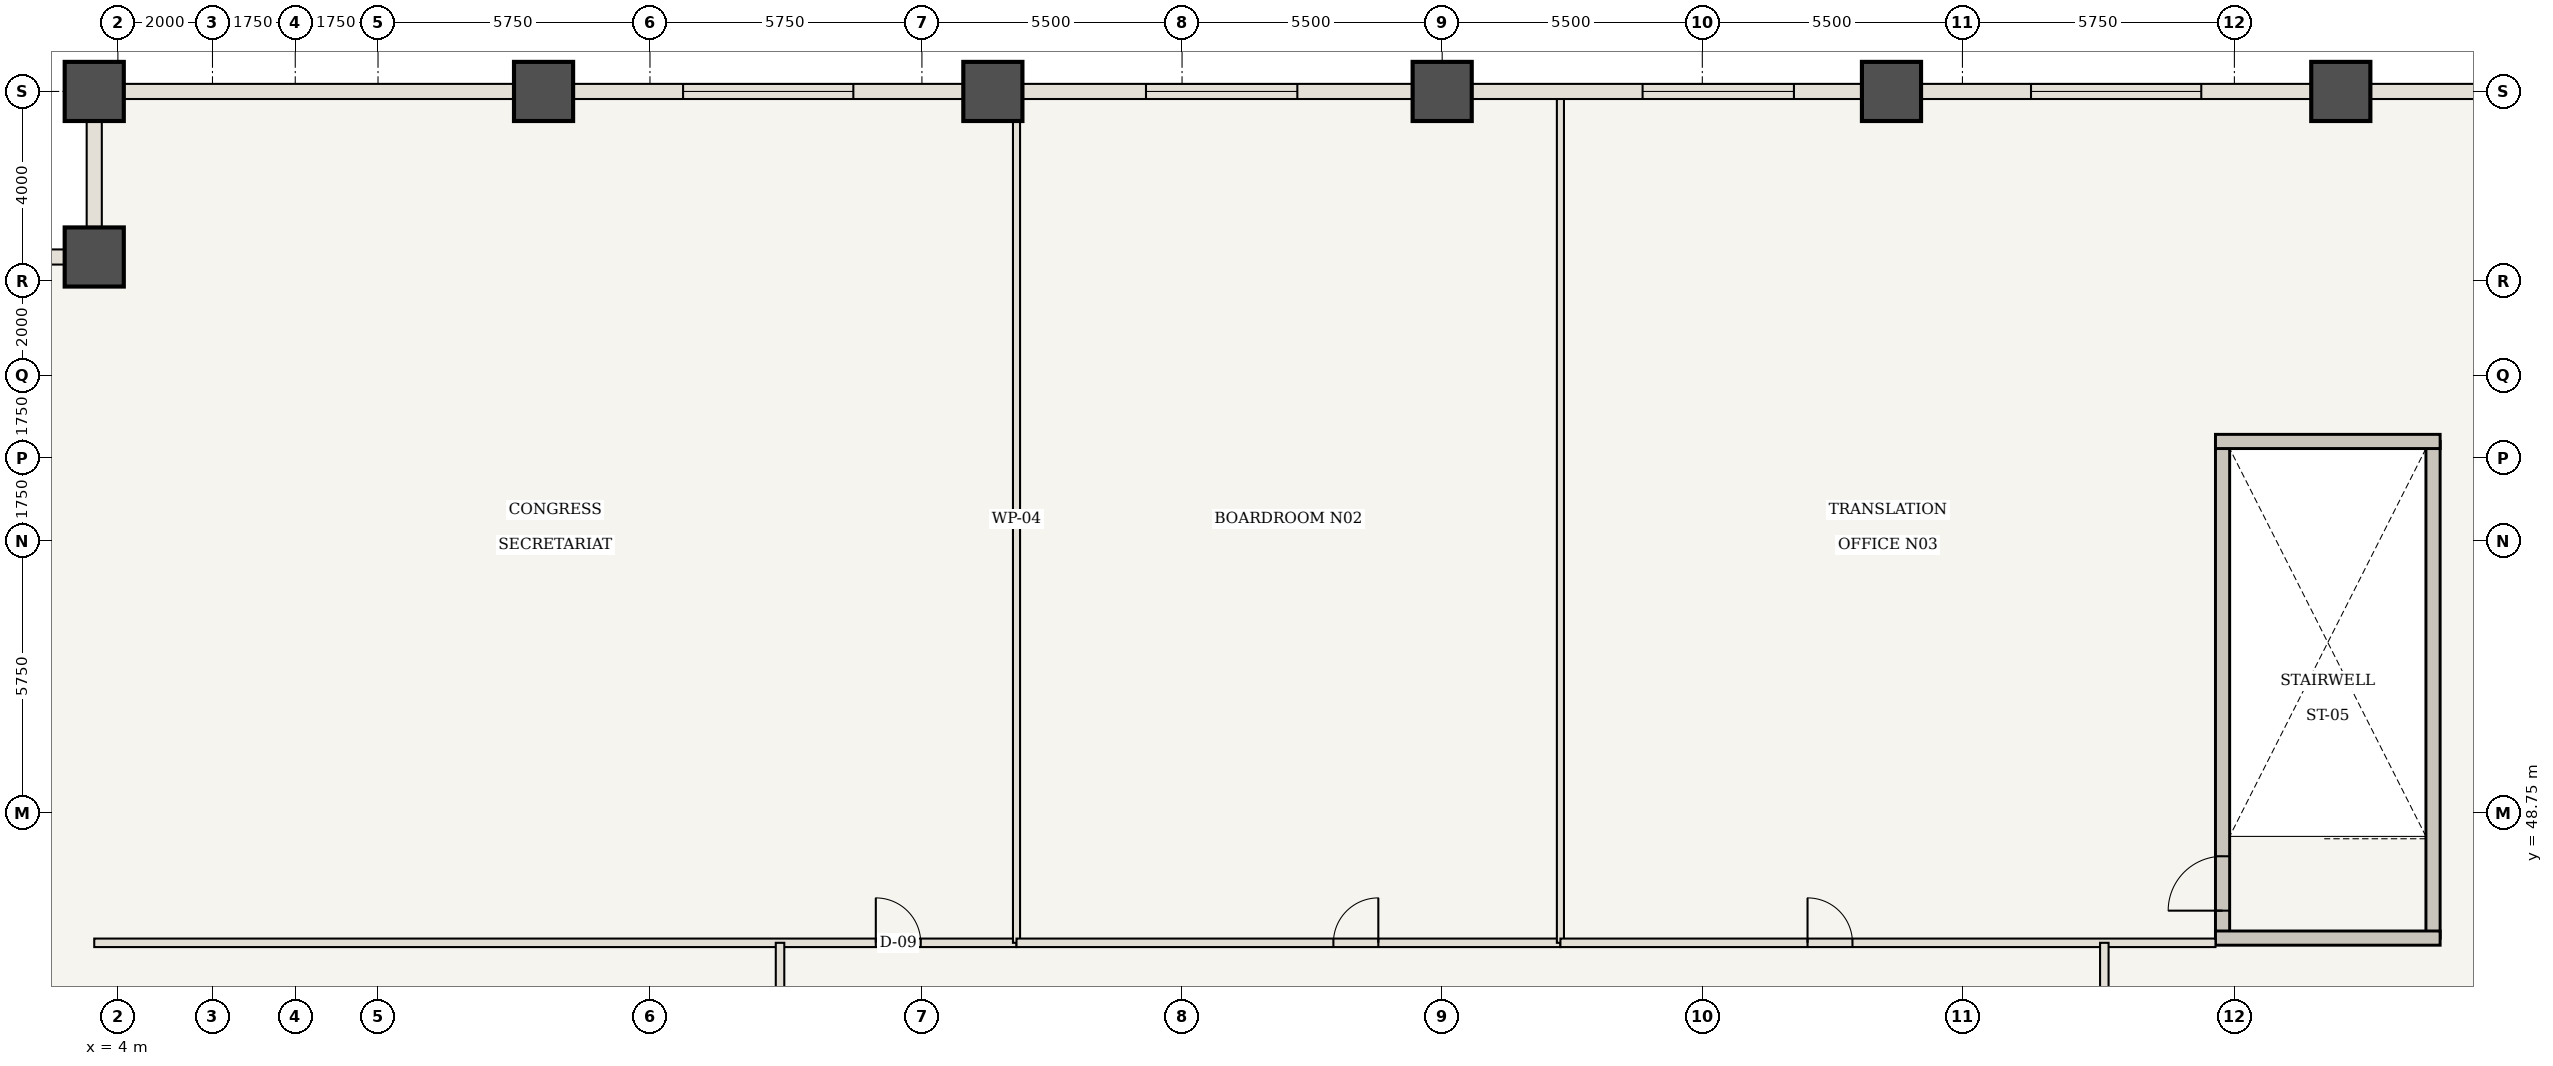
"""IFC4 building model, lengths in metres.
Left out: names, types, materials, properties, quantities, classifications, styles, units other than length and angle.
Written with IfcOpenShell. Run it as: python <this file> out.ifc"""

import sys

from ifc_helpers import new_model, si_unit, direction, frame, frame_2d, origin, origin_2d, place, context, subcontext, project, spatial, rectangle, extrude, element, fill, save


model = new_model("IFC4")
c1 = context("Model", 3, precision=1e-05, world=origin(), true_north=direction((0.0, 1.0)))
c2 = subcontext(c1, "Body", "Model", "MODEL_VIEW")
j1 = project(units=[si_unit("LENGTHUNIT", "METRE"), si_unit("PLANEANGLEUNIT", "RADIAN")], contexts=[c1])
p1 = place(None, origin())
s1 = spatial("IfcSite", under=j1, at=p1, CompositionType="ELEMENT")
p2 = place(p1, origin())
s2 = spatial("IfcBuilding", under=s1, at=p2, CompositionType="ELEMENT")
p3 = place(p2, frame((0.0, 0.0, 29.4)))
s3 = spatial("IfcBuildingStorey", under=s2, at=p3, CompositionType="ELEMENT", Elevation=29.4)
for number, where, z_axis, x_axis in (
    (1, (3.5, 64.0, 0.0), (0.0, 0.0, 1.0), (1.0, 0.0, 0.0)),
    (2, (3.5, 60.5, 0.0), (0.0, 0.0, 1.0), (1.0, 0.0, 0.0)),
    (3, (13.0, 64.0, 0.0), (0.0, 0.0, 1.0), (1.0, 0.0, 0.0)),
    (4, (22.5, 64.0, 0.0), (0.0, 0.0, 1.0), (1.0, 0.0, 0.0)),
    (5, (32.0, 64.0, 0.0), (0.0, 0.0, 1.0), (1.0, 0.0, 0.0)),
    (6, (41.5, 64.0, 0.0), (0.0, 0.0, 1.0), (1.0, 0.0, 0.0)),
    (7, (51.0, 64.0, 0.0), (0.0, 0.0, 1.0), (1.0, 0.0, 0.0)),
):
    element("IfcColumn", number, at=place(p3, frame(where, z_axis=z_axis, x_axis=x_axis)), inside=s3, PredefinedType="COLUMN", context=c2, shape_type="SweptSolid", body=[
        extrude(rectangle(XDim=1.25, YDim=1.25, at=origin_2d()), origin(), (0.0, 0.0, 1.0), 4.48),
    ])
p4 = place(p3, frame((48.5, 46.1, 0.0), z_axis=(0.0, 0.0, 1.0), x_axis=(0.0, 1.0, 0.0)))
e8 = element("IfcWall", 8, at=p4, inside=s3, PredefinedType="SHEAR", context=c2, shape_type="SweptSolid", body=[
    extrude(rectangle(XDim=10.5, YDim=0.3, at=frame_2d((5.25, 0.0))), origin(), (0.0, 0.0, 1.0), 4.48),
])
p5 = place(p4, frame((0.58, 0.0, 0.0)))
e9 = element("IfcOpeningElement", 9, at=p5, cuts=e8, PredefinedType="OPENING", context=c2, shape_type="SweptSolid", body=[
    extrude(rectangle(XDim=1.15, YDim=2.15, at=frame_2d((0.575, 1.075))), frame((0.0, 0.16, 0.0), z_axis=(0.0, -1.0, 0.0), x_axis=(1.0, 0.0, 0.0)), (0.0, 0.0, 1.0), 0.32),
])
p6 = place(p3, frame((52.95, 46.1, 0.0), z_axis=(0.0, 0.0, 1.0), x_axis=(0.0, 1.0, 0.0)))
e10 = element("IfcWall", 10, at=p6, inside=s3, PredefinedType="SHEAR", context=c2, shape_type="SweptSolid", body=[
    extrude(rectangle(XDim=10.5, YDim=0.3, at=frame_2d((5.25, 0.0))), origin(), (0.0, 0.0, 1.0), 4.48),
])
for number, where, z_axis, x_axis in (
    (11, (48.35, 46.1, 0.0), (0.0, 0.0, 1.0), (1.0, 0.0, 0.0)),
    (12, (48.35, 56.6, 0.0), (0.0, 0.0, 1.0), (1.0, 0.0, 0.0)),
):
    element("IfcWall", number, at=place(p3, frame(where, z_axis=z_axis, x_axis=x_axis)), inside=s3, PredefinedType="SHEAR", context=c2, shape_type="SweptSolid", body=[
        extrude(rectangle(XDim=4.75, YDim=0.3, at=frame_2d((2.375, 0.0))), origin(), (0.0, 0.0, 1.0), 4.48),
    ])
p7 = place(p3, frame((3.5, 46.0, 0.0), z_axis=(0.0, 0.0, 1.0), x_axis=(1.0, 0.0, 0.0)))
e13 = element("IfcWall", 13, at=p7, inside=s3, PredefinedType="STANDARD", context=c2, shape_type="SweptSolid", body=[
    extrude(rectangle(XDim=19.5, YDim=0.18, at=frame_2d((9.75, 0.0))), origin(), (0.0, 0.0, 1.0), 4.48),
])
p8 = place(p7, frame((16.525, 0.0, 0.0)))
e14 = element("IfcOpeningElement", 14, at=p8, cuts=e13, PredefinedType="OPENING", context=c2, shape_type="SweptSolid", body=[
    extrude(rectangle(XDim=0.95, YDim=2.15, at=frame_2d((0.475, 1.075))), frame((0.0, 0.1, 0.0), z_axis=(0.0, -1.0, 0.0), x_axis=(1.0, 0.0, 0.0)), (0.0, 0.0, 1.0), 0.2),
])
p9 = place(p3, frame((23.0, 46.0, 0.0), z_axis=(0.0, 0.0, 1.0), x_axis=(0.0, 1.0, 0.0)))
e15 = element("IfcWall", 15, at=p9, inside=s3, PredefinedType="STANDARD", context=c2, shape_type="SweptSolid", body=[
    extrude(rectangle(XDim=17.94, YDim=0.15, at=frame_2d((8.97, 0.0))), origin(), (0.0, 0.0, 1.0), 4.48),
])
p10 = place(p3, frame((23.0, 46.0, 0.0), z_axis=(0.0, 0.0, 1.0), x_axis=(1.0, 0.0, 0.0)))
e16 = element("IfcWall", 16, at=p10, inside=s3, PredefinedType="STANDARD", context=c2, shape_type="SweptSolid", body=[
    extrude(rectangle(XDim=11.5, YDim=0.18, at=frame_2d((5.75, 0.0))), origin(), (0.0, 0.0, 1.0), 4.48),
])
p11 = place(p10, frame((6.7, 0.0, 0.0)))
e17 = element("IfcOpeningElement", 17, at=p11, cuts=e16, PredefinedType="OPENING", context=c2, shape_type="SweptSolid", body=[
    extrude(rectangle(XDim=0.95, YDim=2.15, at=frame_2d((0.475, 1.075))), frame((0.0, 0.1, 0.0), z_axis=(0.0, -1.0, 0.0), x_axis=(1.0, 0.0, 0.0)), (0.0, 0.0, 1.0), 0.2),
])
p12 = place(p3, frame((34.5, 46.0, 0.0), z_axis=(0.0, 0.0, 1.0), x_axis=(0.0, 1.0, 0.0)))
e18 = element("IfcWall", 18, at=p12, inside=s3, PredefinedType="STANDARD", context=c2, shape_type="SweptSolid", body=[
    extrude(rectangle(XDim=17.94, YDim=0.15, at=frame_2d((8.97, 0.0))), origin(), (0.0, 0.0, 1.0), 4.48),
])
p13 = place(p3, frame((34.5, 46.0, 0.0), z_axis=(0.0, 0.0, 1.0), x_axis=(1.0, 0.0, 0.0)))
e19 = element("IfcWall", 19, at=p13, inside=s3, PredefinedType="STANDARD", context=c2, shape_type="SweptSolid", body=[
    extrude(rectangle(XDim=13.85, YDim=0.18, at=frame_2d((6.925, 0.0))), origin(), (0.0, 0.0, 1.0), 4.48),
])
p14 = place(p13, frame((5.225, 0.0, 0.0)))
e20 = element("IfcOpeningElement", 20, at=p14, cuts=e19, PredefinedType="OPENING", context=c2, shape_type="SweptSolid", body=[
    extrude(rectangle(XDim=0.95, YDim=2.15, at=frame_2d((0.475, 1.075))), frame((0.0, 0.1, 0.0), z_axis=(0.0, -1.0, 0.0), x_axis=(1.0, 0.0, 0.0)), (0.0, 0.0, 1.0), 0.2),
])
p15 = place(p3, frame((18.0, 31.2, 0.0), z_axis=(0.0, 0.0, 1.0), x_axis=(0.0, 1.0, 0.0)))
e21 = element("IfcWall", 21, at=p15, inside=s3, PredefinedType="STANDARD", context=c2, shape_type="SweptSolid", body=[
    extrude(rectangle(XDim=14.8, YDim=0.18, at=frame_2d((7.4, 0.0))), origin(), (0.0, 0.0, 1.0), 4.48),
])
p16 = place(p15, frame((6.9, 0.0, 0.0)))
e22 = element("IfcOpeningElement", 22, at=p16, cuts=e21, PredefinedType="OPENING", context=c2, shape_type="SweptSolid", body=[
    extrude(rectangle(XDim=0.95, YDim=2.15, at=frame_2d((0.475, 1.075))), frame((0.0, 0.1, 0.0), z_axis=(0.0, -1.0, 0.0), x_axis=(1.0, 0.0, 0.0)), (0.0, 0.0, 1.0), 0.2),
])
p17 = place(p3, frame((46.0, 32.8, 0.0), z_axis=(0.0, 0.0, 1.0), x_axis=(0.0, 1.0, 0.0)))
e23 = element("IfcWall", 23, at=p17, inside=s3, PredefinedType="STANDARD", context=c2, shape_type="SweptSolid", body=[
    extrude(rectangle(XDim=13.2, YDim=0.18, at=frame_2d((6.6, 0.0))), origin(), (0.0, 0.0, 1.0), 4.48),
])
p18 = place(p17, frame((6.1, 0.0, 0.0)))
e24 = element("IfcOpeningElement", 24, at=p18, cuts=e23, PredefinedType="OPENING", context=c2, shape_type="SweptSolid", body=[
    extrude(rectangle(XDim=0.95, YDim=2.15, at=frame_2d((0.475, 1.075))), frame((0.0, 0.1, 0.0), z_axis=(0.0, -1.0, 0.0), x_axis=(1.0, 0.0, 0.0)), (0.0, 0.0, 1.0), 0.2),
])
p19 = place(p3, frame((3.5, 64.0, 0.0), z_axis=(0.0, 0.0, 1.0), x_axis=(1.0, 0.0, 0.0)))
e25 = element("IfcWall", 25, at=p19, inside=s3, PredefinedType="USERDEFINED", context=c2, shape_type="SweptSolid", body=[
    extrude(rectangle(XDim=9.5, YDim=0.32, at=frame_2d((4.75, 0.0))), origin(), (0.0, 0.0, 1.0), 2.48),
])
p20 = place(p3, frame((13.0, 64.0, 0.0), z_axis=(0.0, 0.0, 1.0), x_axis=(1.0, 0.0, 0.0)))
e26 = element("IfcWall", 26, at=p20, inside=s3, PredefinedType="USERDEFINED", context=c2, shape_type="SweptSolid", body=[
    extrude(rectangle(XDim=9.5, YDim=0.32, at=frame_2d((4.75, 0.0))), origin(), (0.0, 0.0, 1.0), 2.48),
])
p21 = place(p20, frame((2.95, 0.0, 0.85)))
e27 = element("IfcOpeningElement", 27, at=p21, cuts=e26, PredefinedType="OPENING", context=c2, shape_type="SweptSolid", body=[
    extrude(rectangle(XDim=3.6, YDim=1.43, at=frame_2d((1.8, 0.715))), frame((0.0, 0.17, 0.0), z_axis=(0.0, -1.0, 0.0), x_axis=(1.0, 0.0, 0.0)), (0.0, 0.0, 1.0), 0.34),
])
p22 = place(p3, frame((22.5, 64.0, 0.0), z_axis=(0.0, 0.0, 1.0), x_axis=(1.0, 0.0, 0.0)))
e28 = element("IfcWall", 28, at=p22, inside=s3, PredefinedType="USERDEFINED", context=c2, shape_type="SweptSolid", body=[
    extrude(rectangle(XDim=9.5, YDim=0.32, at=frame_2d((4.75, 0.0))), origin(), (0.0, 0.0, 1.0), 2.48),
])
p23 = place(p22, frame((3.238, 0.0, 0.85)))
e29 = element("IfcOpeningElement", 29, at=p23, cuts=e28, PredefinedType="OPENING", context=c2, shape_type="SweptSolid", body=[
    extrude(rectangle(XDim=3.2, YDim=1.43, at=frame_2d((1.6, 0.715))), frame((0.0, 0.17, 0.0), z_axis=(0.0, -1.0, 0.0), x_axis=(1.0, 0.0, 0.0)), (0.0, 0.0, 1.0), 0.34),
])
p24 = place(p3, frame((32.0, 64.0, 0.0), z_axis=(0.0, 0.0, 1.0), x_axis=(1.0, 0.0, 0.0)))
e30 = element("IfcWall", 30, at=p24, inside=s3, PredefinedType="USERDEFINED", context=c2, shape_type="SweptSolid", body=[
    extrude(rectangle(XDim=9.5, YDim=0.32, at=frame_2d((4.75, 0.0))), origin(), (0.0, 0.0, 1.0), 2.48),
])
p25 = place(p24, frame((4.238, 0.0, 0.85)))
e31 = element("IfcOpeningElement", 31, at=p25, cuts=e30, PredefinedType="OPENING", context=c2, shape_type="SweptSolid", body=[
    extrude(rectangle(XDim=3.2, YDim=1.43, at=frame_2d((1.6, 0.715))), frame((0.0, 0.17, 0.0), z_axis=(0.0, -1.0, 0.0), x_axis=(1.0, 0.0, 0.0)), (0.0, 0.0, 1.0), 0.34),
])
p26 = place(p3, frame((41.5, 64.0, 0.0), z_axis=(0.0, 0.0, 1.0), x_axis=(1.0, 0.0, 0.0)))
e32 = element("IfcWall", 32, at=p26, inside=s3, PredefinedType="USERDEFINED", context=c2, shape_type="SweptSolid", body=[
    extrude(rectangle(XDim=9.5, YDim=0.32, at=frame_2d((4.75, 0.0))), origin(), (0.0, 0.0, 1.0), 2.48),
])
p27 = place(p26, frame((2.95, 0.0, 0.85)))
e33 = element("IfcOpeningElement", 33, at=p27, cuts=e32, PredefinedType="OPENING", context=c2, shape_type="SweptSolid", body=[
    extrude(rectangle(XDim=3.6, YDim=1.43, at=frame_2d((1.8, 0.715))), frame((0.0, 0.17, 0.0), z_axis=(0.0, -1.0, 0.0), x_axis=(1.0, 0.0, 0.0)), (0.0, 0.0, 1.0), 0.34),
])
p28 = place(p3, frame((51.0, 64.0, 0.0), z_axis=(0.0, 0.0, 1.0), x_axis=(1.0, 0.0, 0.0)))
e34 = element("IfcWall", 34, at=p28, inside=s3, PredefinedType="USERDEFINED", context=c2, shape_type="SweptSolid", body=[
    extrude(rectangle(XDim=9.5, YDim=0.32, at=frame_2d((4.75, 0.0))), origin(), (0.0, 0.0, 1.0), 2.48),
])
for number, where, z_axis, x_axis in (
    (35, (3.5, 60.5, 0.0), (0.0, 0.0, 1.0), (0.0, 1.0, 0.0)),
    (36, (0.0, 60.5, 0.0), (0.0, 0.0, 1.0), (1.0, 0.0, 0.0)),
):
    element("IfcWall", number, at=place(p3, frame(where, z_axis=z_axis, x_axis=x_axis)), inside=s3, PredefinedType="USERDEFINED", context=c2, shape_type="SweptSolid", body=[
        extrude(rectangle(XDim=3.5, YDim=0.32, at=frame_2d((1.75, 0.0))), origin(), (0.0, 0.0, 1.0), 2.48),
    ])
p29 = place(p5, origin())
e37 = element("IfcDoor", 37, at=p29, inside=s3, OperationType="SINGLE_SWING_LEFT", PredefinedType="DOOR", context=c2, shape_type="SweptSolid", body=[
    extrude(rectangle(XDim=1.15, YDim=2.15, at=frame_2d((0.575, 1.075))), frame((0.0, 0.025, 0.0), z_axis=(0.0, -1.0, 0.0), x_axis=(1.0, 0.0, 0.0)), (0.0, 0.0, 1.0), 0.05),
])
fill(e9, e37)
p30 = place(p8, origin())
e38 = element("IfcDoor", 38, at=p30, inside=s3, OperationType="SINGLE_SWING_LEFT", PredefinedType="DOOR", context=c2, shape_type="SweptSolid", body=[
    extrude(rectangle(XDim=0.95, YDim=2.15, at=frame_2d((0.475, 1.075))), frame((0.0, 0.025, 0.0), z_axis=(0.0, -1.0, 0.0), x_axis=(1.0, 0.0, 0.0)), (0.0, 0.0, 1.0), 0.05),
])
fill(e14, e38)
p31 = place(p11, origin())
e39 = element("IfcDoor", 39, at=p31, inside=s3, OperationType="SINGLE_SWING_RIGHT", PredefinedType="DOOR", context=c2, shape_type="SweptSolid", body=[
    extrude(rectangle(XDim=0.95, YDim=2.15, at=frame_2d((0.475, 1.075))), frame((0.0, 0.025, 0.0), z_axis=(0.0, -1.0, 0.0), x_axis=(1.0, 0.0, 0.0)), (0.0, 0.0, 1.0), 0.05),
])
fill(e17, e39)
p32 = place(p14, origin())
e40 = element("IfcDoor", 40, at=p32, inside=s3, OperationType="SINGLE_SWING_LEFT", PredefinedType="DOOR", context=c2, shape_type="SweptSolid", body=[
    extrude(rectangle(XDim=0.95, YDim=2.15, at=frame_2d((0.475, 1.075))), frame((0.0, 0.025, 0.0), z_axis=(0.0, -1.0, 0.0), x_axis=(1.0, 0.0, 0.0)), (0.0, 0.0, 1.0), 0.05),
])
fill(e20, e40)
p33 = place(p21, origin())
e41 = element("IfcWindow", 41, at=p33, inside=s3, PartitioningType="SINGLE_PANEL", PredefinedType="WINDOW", context=c2, shape_type="SweptSolid", body=[
    extrude(rectangle(XDim=3.6, YDim=1.43, at=frame_2d((1.8, 0.715))), frame((0.0, 0.03, 0.0), z_axis=(0.0, -1.0, 0.0), x_axis=(1.0, 0.0, 0.0)), (0.0, 0.0, 1.0), 0.06),
])
fill(e27, e41)
p34 = place(p23, origin())
e42 = element("IfcWindow", 42, at=p34, inside=s3, PartitioningType="SINGLE_PANEL", PredefinedType="WINDOW", context=c2, shape_type="SweptSolid", body=[
    extrude(rectangle(XDim=3.2, YDim=1.43, at=frame_2d((1.6, 0.715))), frame((0.0, 0.03, 0.0), z_axis=(0.0, -1.0, 0.0), x_axis=(1.0, 0.0, 0.0)), (0.0, 0.0, 1.0), 0.06),
])
fill(e29, e42)
p35 = place(p25, origin())
e43 = element("IfcWindow", 43, at=p35, inside=s3, PartitioningType="SINGLE_PANEL", PredefinedType="WINDOW", context=c2, shape_type="SweptSolid", body=[
    extrude(rectangle(XDim=3.2, YDim=1.43, at=frame_2d((1.6, 0.715))), frame((0.0, 0.03, 0.0), z_axis=(0.0, -1.0, 0.0), x_axis=(1.0, 0.0, 0.0)), (0.0, 0.0, 1.0), 0.06),
])
fill(e31, e43)
p36 = place(p27, origin())
e44 = element("IfcWindow", 44, at=p36, inside=s3, PartitioningType="SINGLE_PANEL", PredefinedType="WINDOW", context=c2, shape_type="SweptSolid", body=[
    extrude(rectangle(XDim=3.6, YDim=1.43, at=frame_2d((1.8, 0.715))), frame((0.0, 0.03, 0.0), z_axis=(0.0, -1.0, 0.0), x_axis=(1.0, 0.0, 0.0)), (0.0, 0.0, 1.0), 0.06),
])
fill(e33, e44)
save(model, sys.argv[1])
